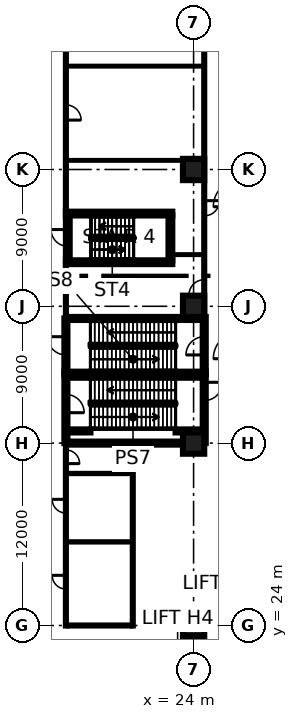
"""IFC4 building model, lengths in metres.
Left out: names, types, materials, properties, quantities, classifications, styles, units other than length and angle.
Written with IfcOpenShell. Run it as: python <this file> out.ifc"""

import sys

from ifc_helpers import new_model, si_unit, direction, frame, frame_2d, origin, origin_2d, place, context, subcontext, project, spatial, rectangle, extrude, element, fill, save


model = new_model("IFC4")
c1 = context("Model", 3, precision=1e-05, world=origin(), true_north=direction((0.0, 1.0)))
c2 = subcontext(c1, "Body", "Model", "MODEL_VIEW")
j1 = project(units=[si_unit("LENGTHUNIT", "METRE"), si_unit("PLANEANGLEUNIT", "RADIAN")], contexts=[c1])
p1 = place(None, origin())
s1 = spatial("IfcSite", under=j1, at=p1, CompositionType="ELEMENT")
p2 = place(p1, origin())
s2 = spatial("IfcBuilding", under=s1, at=p2, CompositionType="ELEMENT")
p3 = place(p2, origin())
s3 = spatial("IfcBuildingStorey", under=s2, at=p3, CompositionType="ELEMENT", Elevation=0.0)
for number, where, z_axis, x_axis in (
    (1, (24.0, 24.0, 0.0), (0.0, 0.0, 1.0), (1.0, 0.0, 0.0)),
    (2, (24.0, 36.0, 0.0), (0.0, 0.0, 1.0), (1.0, 0.0, 0.0)),
    (3, (24.0, 45.0, 0.0), (0.0, 0.0, 1.0), (1.0, 0.0, 0.0)),
    (4, (24.0, 54.0, 0.0), (0.0, 0.0, 1.0), (1.0, 0.0, 0.0)),
):
    element("IfcColumn", number, at=place(p3, frame(where, z_axis=z_axis, x_axis=x_axis)), inside=s3, PredefinedType="COLUMN", context=c2, shape_type="SweptSolid", body=[
        extrude(rectangle(XDim=1.4, YDim=1.4, at=origin_2d()), origin(), (0.0, 0.0, 1.0), 7.2),
    ])
for number, where, z_axis, x_axis in (
    (5, (15.6, 47.9, 0.0), (0.0, 0.0, 1.0), (1.0, 0.0, 0.0)),
    (6, (15.6, 51.1, 0.0), (0.0, 0.0, 1.0), (1.0, 0.0, 0.0)),
):
    element("IfcWall", number, at=place(p3, frame(where, z_axis=z_axis, x_axis=x_axis)), inside=s3, PredefinedType="SHEAR", context=c2, shape_type="SweptSolid", body=[
        extrude(rectangle(XDim=7.0, YDim=0.25, at=frame_2d((3.5, 0.0))), origin(), (0.0, 0.0, 1.0), 7.2),
    ])
p4 = place(p3, frame((15.725, 48.025, 0.0), z_axis=(0.0, 0.0, 1.0), x_axis=(0.0, 1.0, 0.0)))
e7 = element("IfcWall", 7, at=p4, inside=s3, PredefinedType="SHEAR", context=c2, shape_type="SweptSolid", body=[
    extrude(rectangle(XDim=2.95, YDim=0.25, at=frame_2d((1.475, 0.0))), origin(), (0.0, 0.0, 1.0), 7.2),
])
p5 = place(p4, frame((0.925, 0.0, 0.0)))
e8 = element("IfcOpeningElement", 8, at=p5, cuts=e7, PredefinedType="OPENING", context=c2, shape_type="SweptSolid", body=[
    extrude(rectangle(XDim=1.1, YDim=2.2, at=frame_2d((0.55, 1.1))), frame((0.0, 0.135, 0.0), z_axis=(0.0, -1.0, 0.0), x_axis=(1.0, 0.0, 0.0)), (0.0, 0.0, 1.0), 0.27),
])
p6 = place(p3, frame((22.475, 48.025, 0.0), z_axis=(0.0, 0.0, 1.0), x_axis=(0.0, 1.0, 0.0)))
e9 = element("IfcWall", 9, at=p6, inside=s3, PredefinedType="SHEAR", context=c2, shape_type="SweptSolid", body=[
    extrude(rectangle(XDim=2.95, YDim=0.25, at=frame_2d((1.475, 0.0))), origin(), (0.0, 0.0, 1.0), 7.2),
])
p7 = place(p3, frame((15.5, 40.6, 0.0), z_axis=(0.0, 0.0, 1.0), x_axis=(1.0, 0.0, 0.0)))
e10 = element("IfcWall", 10, at=p7, inside=s3, PredefinedType="SOLIDWALL", context=c2, shape_type="SweptSolid", body=[
    extrude(rectangle(XDim=9.3, YDim=0.2, at=frame_2d((4.65, 0.0))), origin(), (0.0, 0.0, 1.0), 6.8),
])
p8 = place(p3, frame((15.6, 23.9, 0.0), z_axis=(0.0, 0.0, 1.0), x_axis=(0.0, 1.0, 0.0)))
e11 = element("IfcWall", 11, at=p8, inside=s3, PredefinedType="PARTITIONING", context=c2, shape_type="SweptSolid", body=[
    extrude(rectangle(XDim=12.1, YDim=0.2, at=frame_2d((6.05, 0.0))), origin(), (0.0, 0.0, 1.0), 6.8),
])
p9 = place(p8, frame((10.75, 0.0, 0.0)))
e12 = element("IfcOpeningElement", 12, at=p9, cuts=e11, PredefinedType="OPENING", context=c2, shape_type="SweptSolid", body=[
    extrude(rectangle(XDim=0.9, YDim=2.1, at=frame_2d((0.45, 1.05))), frame((0.0, 0.11, 0.0), z_axis=(0.0, -1.0, 0.0), x_axis=(1.0, 0.0, 0.0)), (0.0, 0.0, 1.0), 0.22),
])
p10 = place(p8, frame((7.5, 0.0, 0.0)))
e13 = element("IfcOpeningElement", 13, at=p10, cuts=e11, PredefinedType="OPENING", context=c2, shape_type="SweptSolid", body=[
    extrude(rectangle(XDim=0.9, YDim=2.1, at=frame_2d((0.45, 1.05))), frame((0.0, 0.11, 0.0), z_axis=(0.0, -1.0, 0.0), x_axis=(1.0, 0.0, 0.0)), (0.0, 0.0, 1.0), 0.22),
])
p11 = place(p8, frame((2.5, 0.0, 0.0)))
e14 = element("IfcOpeningElement", 14, at=p11, cuts=e11, PredefinedType="OPENING", context=c2, shape_type="SweptSolid", body=[
    extrude(rectangle(XDim=0.9, YDim=2.1, at=frame_2d((0.45, 1.05))), frame((0.0, 0.11, 0.0), z_axis=(0.0, -1.0, 0.0), x_axis=(1.0, 0.0, 0.0)), (0.0, 0.0, 1.0), 0.22),
])
p12 = place(p3, frame((15.6, 36.0, 0.0), z_axis=(0.0, 0.0, 1.0), x_axis=(0.0, 1.0, 0.0)))
e15 = element("IfcWall", 15, at=p12, inside=s3, PredefinedType="SOLIDWALL", context=c2, shape_type="SweptSolid", body=[
    extrude(rectangle(XDim=4.4, YDim=0.2, at=frame_2d((2.2, 0.0))), origin(), (0.0, 0.0, 1.0), 6.8),
])
p13 = place(p12, frame((2.0, 0.0, 0.0)))
e16 = element("IfcOpeningElement", 16, at=p13, cuts=e15, PredefinedType="OPENING", context=c2, shape_type="SweptSolid", body=[
    extrude(rectangle(XDim=1.2, YDim=2.1, at=frame_2d((0.6, 1.05))), frame((0.0, 0.11, 0.0), z_axis=(0.0, -1.0, 0.0), x_axis=(1.0, 0.0, 0.0)), (0.0, 0.0, 1.0), 0.22),
])
p14 = place(p3, frame((15.6, 40.7, 0.0), z_axis=(0.0, 0.0, 1.0), x_axis=(0.0, 1.0, 0.0)))
e17 = element("IfcWall", 17, at=p14, inside=s3, PredefinedType="SOLIDWALL", context=c2, shape_type="SweptSolid", body=[
    extrude(rectangle(XDim=3.5, YDim=0.2, at=frame_2d((1.75, 0.0))), origin(), (0.0, 0.0, 1.0), 6.8),
])
p15 = place(p14, frame((1.1, 0.0, 0.0)))
e18 = element("IfcOpeningElement", 18, at=p15, cuts=e17, PredefinedType="OPENING", context=c2, shape_type="SweptSolid", body=[
    extrude(rectangle(XDim=1.2, YDim=2.1, at=frame_2d((0.6, 1.05))), frame((0.0, 0.11, 0.0), z_axis=(0.0, -1.0, 0.0), x_axis=(1.0, 0.0, 0.0)), (0.0, 0.0, 1.0), 0.22),
])
p16 = place(p3, frame((15.6, 44.2, 0.0), z_axis=(0.0, 0.0, 1.0), x_axis=(0.0, 1.0, 0.0)))
e19 = element("IfcWall", 19, at=p16, inside=s3, PredefinedType="PARTITIONING", context=c2, shape_type="SweptSolid", body=[
    extrude(rectangle(XDim=3.575, YDim=0.2, at=frame_2d((1.788, 0.0))), origin(), (0.0, 0.0, 1.0), 6.8),
])
p17 = place(p3, frame((15.6, 51.225, 0.0), z_axis=(0.0, 0.0, 1.0), x_axis=(0.0, 1.0, 0.0)))
e20 = element("IfcWall", 20, at=p17, inside=s3, PredefinedType="PARTITIONING", context=c2, shape_type="SweptSolid", body=[
    extrude(rectangle(XDim=12.575, YDim=0.2, at=frame_2d((6.288, 0.0))), origin(), (0.0, 0.0, 1.0), 6.8),
])
p18 = place(p17, frame((6.025, 0.0, 0.0)))
e21 = element("IfcOpeningElement", 21, at=p18, cuts=e20, PredefinedType="OPENING", context=c2, shape_type="SweptSolid", body=[
    extrude(rectangle(XDim=1.0, YDim=2.1, at=frame_2d((0.5, 1.05))), frame((0.0, 0.11, 0.0), z_axis=(0.0, -1.0, 0.0), x_axis=(1.0, 0.0, 0.0)), (0.0, 0.0, 1.0), 0.22),
])
p19 = place(p3, frame((15.7, 24.0, 0.0), z_axis=(0.0, 0.0, 1.0), x_axis=(1.0, 0.0, 0.0)))
e22 = element("IfcWall", 22, at=p19, inside=s3, PredefinedType="PARTITIONING", context=c2, shape_type="SweptSolid", body=[
    extrude(rectangle(XDim=4.2, YDim=0.2, at=frame_2d((2.1, 0.0))), origin(), (0.0, 0.0, 1.0), 6.8),
])
for number, where, z_axis, x_axis in (
    (23, (15.7, 29.5, 0.0), (0.0, 0.0, 1.0), (1.0, 0.0, 0.0)),
    (24, (15.7, 34.0, 0.0), (0.0, 0.0, 1.0), (1.0, 0.0, 0.0)),
):
    element("IfcWall", number, at=place(p3, frame(where, z_axis=z_axis, x_axis=x_axis)), inside=s3, PredefinedType="PARTITIONING", context=c2, shape_type="SweptSolid", body=[
        extrude(rectangle(XDim=4.2, YDim=0.15, at=frame_2d((2.1, 0.0))), origin(), (0.0, 0.0, 1.0), 6.8),
    ])
p20 = place(p3, frame((15.7, 36.0, 0.0), z_axis=(0.0, 0.0, 1.0), x_axis=(1.0, 0.0, 0.0)))
e25 = element("IfcWall", 25, at=p20, inside=s3, PredefinedType="SOLIDWALL", context=c2, shape_type="SweptSolid", body=[
    extrude(rectangle(XDim=8.3, YDim=0.2, at=frame_2d((4.15, 0.0))), origin(), (0.0, 0.0, 1.0), 6.8),
])
p21 = place(p3, frame((15.7, 44.2, 0.0), z_axis=(0.0, 0.0, 1.0), x_axis=(1.0, 0.0, 0.0)))
e26 = element("IfcWall", 26, at=p21, inside=s3, PredefinedType="SOLIDWALL", context=c2, shape_type="SweptSolid", body=[
    extrude(rectangle(XDim=8.9, YDim=0.2, at=frame_2d((4.45, 0.0))), origin(), (0.0, 0.0, 1.0), 6.8),
])
for number, where, z_axis, x_axis in (
    (27, (15.7, 54.6, 0.0), (0.0, 0.0, 1.0), (1.0, 0.0, 0.0)),
    (28, (15.7, 60.8, 0.0), (0.0, 0.0, 1.0), (1.0, 0.0, 0.0)),
):
    element("IfcWall", number, at=place(p3, frame(where, z_axis=z_axis, x_axis=x_axis)), inside=s3, PredefinedType="PARTITIONING", context=c2, shape_type="SweptSolid", body=[
        extrude(rectangle(XDim=8.9, YDim=0.125, at=frame_2d((4.45, 0.0))), origin(), (0.0, 0.0, 1.0), 6.8),
    ])
p22 = place(p3, frame((20.0, 23.9, 0.0), z_axis=(0.0, 0.0, 1.0), x_axis=(0.0, 1.0, 0.0)))
e29 = element("IfcWall", 29, at=p22, inside=s3, PredefinedType="PARTITIONING", context=c2, shape_type="SweptSolid", body=[
    extrude(rectangle(XDim=12.0, YDim=0.2, at=frame_2d((6.0, 0.0))), origin(), (0.0, 0.0, 1.0), 6.8),
])
p23 = place(p3, frame((22.6, 48.4, 0.0), z_axis=(0.0, 0.0, 1.0), x_axis=(1.0, 0.0, 0.0)))
e30 = element("IfcWall", 30, at=p23, inside=s3, PredefinedType="PARTITIONING", context=c2, shape_type="SweptSolid", body=[
    extrude(rectangle(XDim=2.0, YDim=0.125, at=frame_2d((1.0, 0.0))), origin(), (0.0, 0.0, 1.0), 6.8),
])
p24 = place(p3, frame((24.7, 36.0, 0.0), z_axis=(0.0, 0.0, 1.0), x_axis=(0.0, 1.0, 0.0)))
e31 = element("IfcWall", 31, at=p24, inside=s3, PredefinedType="SOLIDWALL", context=c2, shape_type="SweptSolid", body=[
    extrude(rectangle(XDim=4.4, YDim=0.2, at=frame_2d((2.2, 0.0))), origin(), (0.0, 0.0, 1.0), 6.8),
])
p25 = place(p24, frame((2.8, 0.0, 0.0)))
e32 = element("IfcOpeningElement", 32, at=p25, cuts=e31, PredefinedType="OPENING", context=c2, shape_type="SweptSolid", body=[
    extrude(rectangle(XDim=1.2, YDim=2.1, at=frame_2d((0.6, 1.05))), frame((0.0, 0.11, 0.0), z_axis=(0.0, -1.0, 0.0), x_axis=(1.0, 0.0, 0.0)), (0.0, 0.0, 1.0), 0.22),
])
p26 = place(p3, frame((24.7, 40.7, 0.0), z_axis=(0.0, 0.0, 1.0), x_axis=(0.0, 1.0, 0.0)))
e33 = element("IfcWall", 33, at=p26, inside=s3, PredefinedType="SOLIDWALL", context=c2, shape_type="SweptSolid", body=[
    extrude(rectangle(XDim=3.6, YDim=0.2, at=frame_2d((1.8, 0.0))), origin(), (0.0, 0.0, 1.0), 6.8),
])
p27 = place(p26, frame((1.1, 0.0, 0.0)))
e34 = element("IfcOpeningElement", 34, at=p27, cuts=e33, PredefinedType="OPENING", context=c2, shape_type="SweptSolid", body=[
    extrude(rectangle(XDim=1.2, YDim=2.1, at=frame_2d((0.6, 1.05))), frame((0.0, 0.11, 0.0), z_axis=(0.0, -1.0, 0.0), x_axis=(1.0, 0.0, 0.0)), (0.0, 0.0, 1.0), 0.22),
])
p28 = place(p3, frame((24.7, 44.3, 0.0), z_axis=(0.0, 0.0, 1.0), x_axis=(0.0, 1.0, 0.0)))
e35 = element("IfcWall", 35, at=p28, inside=s3, PredefinedType="PARTITIONING", context=c2, shape_type="SweptSolid", body=[
    extrude(rectangle(XDim=19.5, YDim=0.2, at=frame_2d((9.75, 0.0))), origin(), (0.0, 0.0, 1.0), 6.8),
])
p29 = place(p28, frame((1.45, 0.0, 0.0)))
e36 = element("IfcOpeningElement", 36, at=p29, cuts=e35, PredefinedType="OPENING", context=c2, shape_type="SweptSolid", body=[
    extrude(rectangle(XDim=1.0, YDim=2.1, at=frame_2d((0.5, 1.05))), frame((0.0, 0.11, 0.0), z_axis=(0.0, -1.0, 0.0), x_axis=(1.0, 0.0, 0.0)), (0.0, 0.0, 1.0), 0.22),
])
p30 = place(p28, frame((6.65, 0.0, 0.0)))
e37 = element("IfcOpeningElement", 37, at=p30, cuts=e35, PredefinedType="OPENING", context=c2, shape_type="SweptSolid", body=[
    extrude(rectangle(XDim=1.0, YDim=2.1, at=frame_2d((0.5, 1.05))), frame((0.0, 0.11, 0.0), z_axis=(0.0, -1.0, 0.0), x_axis=(1.0, 0.0, 0.0)), (0.0, 0.0, 1.0), 0.22),
])
for number, where, z_axis, x_axis in (
    (38, (22.815, 36.8, 0.0), (0.0, 0.0, 1.0), (1.0, 0.0, 0.0)),
    (39, (22.815, 40.4, 0.0), (0.0, 0.0, 1.0), (1.0, 0.0, 0.0)),
):
    element("IfcWall", number, at=place(p3, frame(where, z_axis=z_axis, x_axis=x_axis)), inside=s3, PredefinedType="SOLIDWALL", context=c2, shape_type="SweptSolid", body=[
        extrude(rectangle(XDim=1.785, YDim=0.2, at=frame_2d((0.893, 0.0))), origin(), (0.0, 0.0, 1.0), 6.8),
    ])
for number, where, z_axis, x_axis in (
    (40, (15.7, 36.8, 0.0), (0.0, 0.0, 1.0), (1.0, 0.0, 0.0)),
    (41, (15.7, 40.4, 0.0), (0.0, 0.0, 1.0), (1.0, 0.0, 0.0)),
):
    element("IfcWall", number, at=place(p3, frame(where, z_axis=z_axis, x_axis=x_axis)), inside=s3, PredefinedType="SOLIDWALL", context=c2, shape_type="SweptSolid", body=[
        extrude(rectangle(XDim=1.515, YDim=0.2, at=frame_2d((0.758, 0.0))), origin(), (0.0, 0.0, 1.0), 6.8),
    ])
p31 = place(p5, frame((1.1, 0.0, 0.0), z_axis=(0.0, 0.0, 1.0), x_axis=(-1.0, 0.0, 0.0)))
e42 = element("IfcDoor", 42, at=p31, inside=s3, OperationType="SINGLE_SWING_RIGHT", PredefinedType="DOOR", context=c2, shape_type="SweptSolid", body=[
    extrude(rectangle(XDim=1.1, YDim=2.2, at=frame_2d((0.55, 1.1))), frame((0.0, 0.025, 0.0), z_axis=(0.0, -1.0, 0.0), x_axis=(1.0, 0.0, 0.0)), (0.0, 0.0, 1.0), 0.05),
])
fill(e8, e42)
p32 = place(p29, origin())
e43 = element("IfcDoor", 43, at=p32, inside=s3, OperationType="SINGLE_SWING_LEFT", PredefinedType="DOOR", context=c2, shape_type="SweptSolid", body=[
    extrude(rectangle(XDim=1.0, YDim=2.1, at=frame_2d((0.5, 1.05))), frame((0.0, 0.025, 0.0), z_axis=(0.0, -1.0, 0.0), x_axis=(1.0, 0.0, 0.0)), (0.0, 0.0, 1.0), 0.05),
])
fill(e36, e43)
p33 = place(p30, origin())
e44 = element("IfcDoor", 44, at=p33, inside=s3, OperationType="SINGLE_SWING_RIGHT", PredefinedType="DOOR", context=c2, shape_type="SweptSolid", body=[
    extrude(rectangle(XDim=1.0, YDim=2.1, at=frame_2d((0.5, 1.05))), frame((0.0, 0.025, 0.0), z_axis=(0.0, -1.0, 0.0), x_axis=(1.0, 0.0, 0.0)), (0.0, 0.0, 1.0), 0.05),
])
fill(e37, e44)
p34 = place(p18, frame((1.0, 0.0, 0.0), z_axis=(0.0, 0.0, 1.0), x_axis=(-1.0, 0.0, 0.0)))
e45 = element("IfcDoor", 45, at=p34, inside=s3, OperationType="SINGLE_SWING_LEFT", PredefinedType="DOOR", context=c2, shape_type="SweptSolid", body=[
    extrude(rectangle(XDim=1.0, YDim=2.1, at=frame_2d((0.5, 1.05))), frame((0.0, 0.025, 0.0), z_axis=(0.0, -1.0, 0.0), x_axis=(1.0, 0.0, 0.0)), (0.0, 0.0, 1.0), 0.05),
])
fill(e21, e45)
p35 = place(p13, frame((1.2, 0.0, 0.0), z_axis=(0.0, 0.0, 1.0), x_axis=(-1.0, 0.0, 0.0)))
e46 = element("IfcDoor", 46, at=p35, inside=s3, OperationType="SINGLE_SWING_LEFT", PredefinedType="DOOR", context=c2, shape_type="SweptSolid", body=[
    extrude(rectangle(XDim=1.2, YDim=2.1, at=frame_2d((0.6, 1.05))), frame((0.0, 0.025, 0.0), z_axis=(0.0, -1.0, 0.0), x_axis=(1.0, 0.0, 0.0)), (0.0, 0.0, 1.0), 0.05),
])
fill(e16, e46)
p36 = place(p25, origin())
e47 = element("IfcDoor", 47, at=p36, inside=s3, OperationType="SINGLE_SWING_RIGHT", PredefinedType="DOOR", context=c2, shape_type="SweptSolid", body=[
    extrude(rectangle(XDim=1.2, YDim=2.1, at=frame_2d((0.6, 1.05))), frame((0.0, 0.025, 0.0), z_axis=(0.0, -1.0, 0.0), x_axis=(1.0, 0.0, 0.0)), (0.0, 0.0, 1.0), 0.05),
])
fill(e32, e47)
p37 = place(p15, frame((1.2, 0.0, 0.0), z_axis=(0.0, 0.0, 1.0), x_axis=(-1.0, 0.0, 0.0)))
e48 = element("IfcDoor", 48, at=p37, inside=s3, OperationType="SINGLE_SWING_RIGHT", PredefinedType="DOOR", context=c2, shape_type="SweptSolid", body=[
    extrude(rectangle(XDim=1.2, YDim=2.1, at=frame_2d((0.6, 1.05))), frame((0.0, 0.025, 0.0), z_axis=(0.0, -1.0, 0.0), x_axis=(1.0, 0.0, 0.0)), (0.0, 0.0, 1.0), 0.05),
])
fill(e18, e48)
p38 = place(p27, origin())
e49 = element("IfcDoor", 49, at=p38, inside=s3, OperationType="SINGLE_SWING_LEFT", PredefinedType="DOOR", context=c2, shape_type="SweptSolid", body=[
    extrude(rectangle(XDim=1.2, YDim=2.1, at=frame_2d((0.6, 1.05))), frame((0.0, 0.025, 0.0), z_axis=(0.0, -1.0, 0.0), x_axis=(1.0, 0.0, 0.0)), (0.0, 0.0, 1.0), 0.05),
])
fill(e34, e49)
p39 = place(p9, frame((0.9, 0.0, 0.0), z_axis=(0.0, 0.0, 1.0), x_axis=(-1.0, 0.0, 0.0)))
e50 = element("IfcDoor", 50, at=p39, inside=s3, OperationType="SINGLE_SWING_LEFT", PredefinedType="DOOR", context=c2, shape_type="SweptSolid", body=[
    extrude(rectangle(XDim=0.9, YDim=2.1, at=frame_2d((0.45, 1.05))), frame((0.0, 0.025, 0.0), z_axis=(0.0, -1.0, 0.0), x_axis=(1.0, 0.0, 0.0)), (0.0, 0.0, 1.0), 0.05),
])
fill(e12, e50)
p40 = place(p10, frame((0.9, 0.0, 0.0), z_axis=(0.0, 0.0, 1.0), x_axis=(-1.0, 0.0, 0.0)))
e51 = element("IfcDoor", 51, at=p40, inside=s3, OperationType="SINGLE_SWING_RIGHT", PredefinedType="DOOR", context=c2, shape_type="SweptSolid", body=[
    extrude(rectangle(XDim=0.9, YDim=2.1, at=frame_2d((0.45, 1.05))), frame((0.0, 0.025, 0.0), z_axis=(0.0, -1.0, 0.0), x_axis=(1.0, 0.0, 0.0)), (0.0, 0.0, 1.0), 0.05),
])
fill(e13, e51)
p41 = place(p11, frame((0.9, 0.0, 0.0), z_axis=(0.0, 0.0, 1.0), x_axis=(-1.0, 0.0, 0.0)))
e52 = element("IfcDoor", 52, at=p41, inside=s3, OperationType="SINGLE_SWING_RIGHT", PredefinedType="DOOR", context=c2, shape_type="SweptSolid", body=[
    extrude(rectangle(XDim=0.9, YDim=2.1, at=frame_2d((0.45, 1.05))), frame((0.0, 0.025, 0.0), z_axis=(0.0, -1.0, 0.0), x_axis=(1.0, 0.0, 0.0)), (0.0, 0.0, 1.0), 0.05),
])
fill(e14, e52)
save(model, sys.argv[1])
